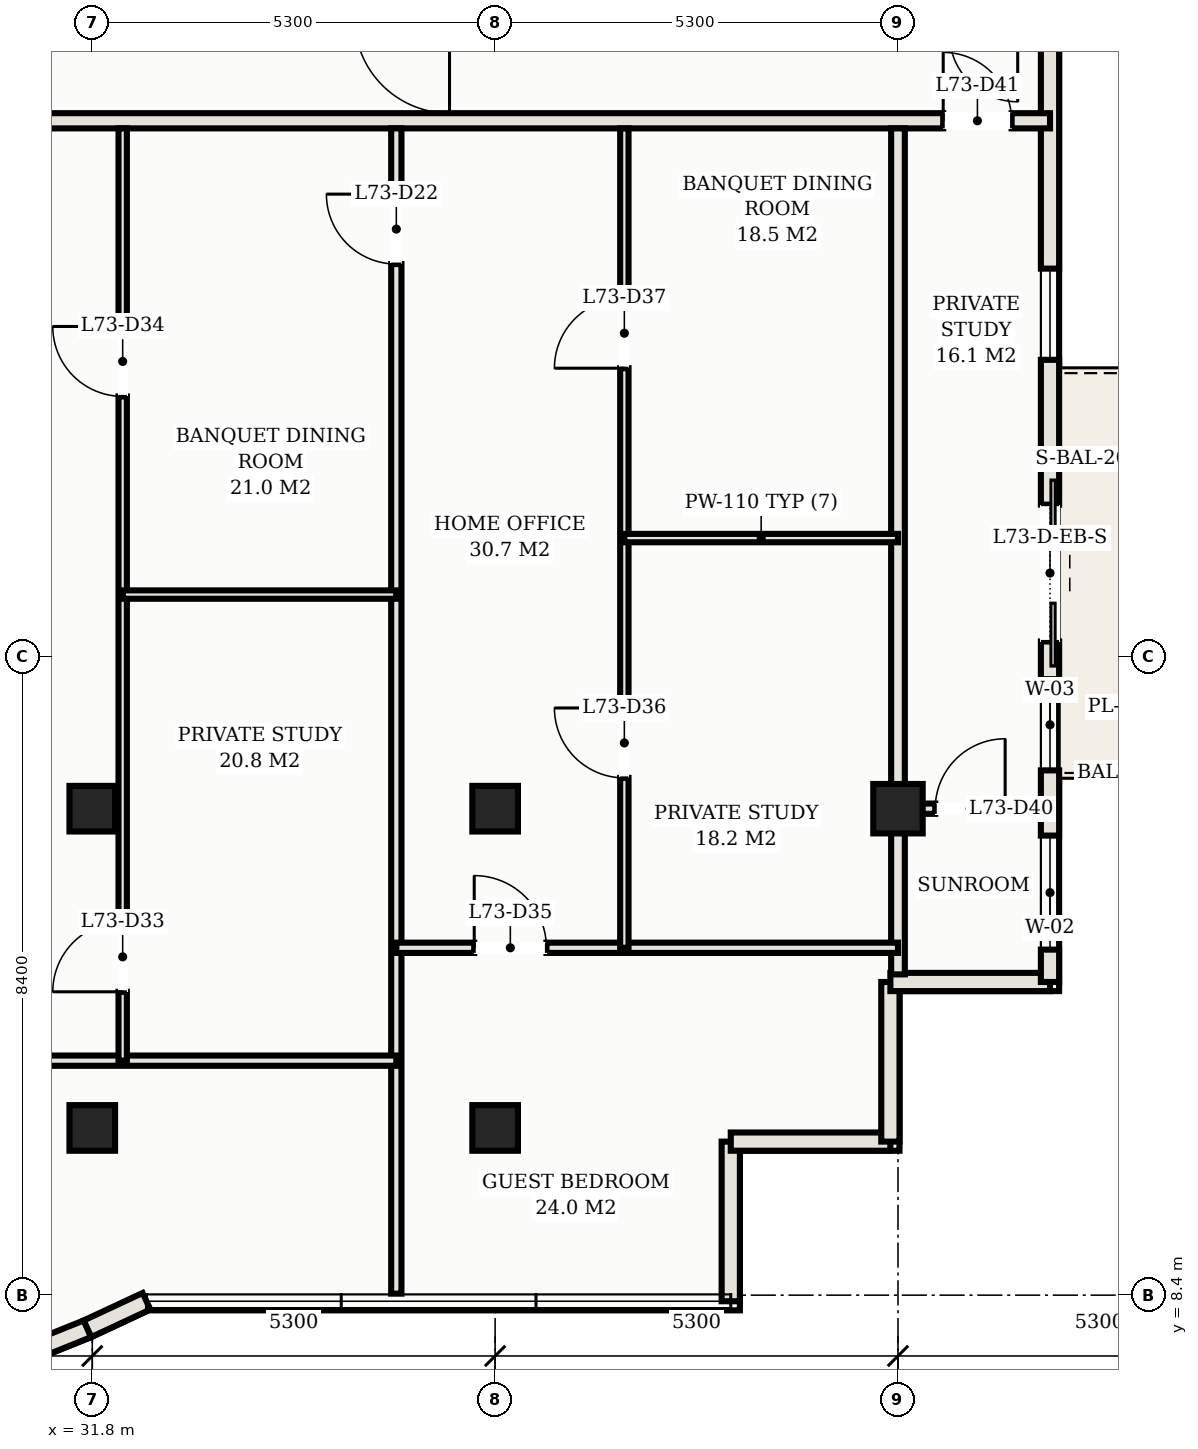
"""IFC4 building model, lengths in metres.
Left out: names, types, materials, properties, quantities, classifications, styles, units other than length and angle.
Written with IfcOpenShell. Run it as: python <this file> out.ifc"""

import sys

from ifc_helpers import new_model, si_unit, direction, frame, frame_2d, origin, origin_2d, place, context, subcontext, project, spatial, rectangle, hollow_rectangle, extrude, element, fill, save


model = new_model("IFC4")
c1 = context("Model", 3, precision=1e-05, world=origin(), true_north=direction((0.0, 1.0)))
c2 = subcontext(c1, "Body", "Model", "MODEL_VIEW")
j1 = project(units=[si_unit("LENGTHUNIT", "METRE"), si_unit("PLANEANGLEUNIT", "RADIAN")], contexts=[c1])
p1 = place(None, origin())
s1 = spatial("IfcSite", under=j1, at=p1, CompositionType="ELEMENT")
p2 = place(p1, origin())
s2 = spatial("IfcBuilding", under=s1, at=p2, CompositionType="ELEMENT")
p3 = place(p2, frame((0.0, 0.0, 262.7)))
s3 = spatial("IfcBuildingStorey", under=s2, at=p3, CompositionType="ELEMENT", Elevation=262.7)
p4 = place(p3, frame((31.8, 14.8, 0.0), z_axis=(0.0, 0.0, 1.0), x_axis=(1.0, 0.0, 0.0)))
e1 = element("IfcColumn", 1, at=p4, inside=s3, PredefinedType="COLUMN", context=c2, shape_type="SweptSolid", body=[
    extrude(hollow_rectangle(XDim=0.6, YDim=0.6, WallThickness=0.022, at=origin_2d()), origin(), (0.0, 0.0, 1.0), 3.3),
])
p5 = place(p3, frame((31.8, 10.6, 0.0), z_axis=(0.0, 0.0, 1.0), x_axis=(1.0, 0.0, 0.0)))
e2 = element("IfcColumn", 2, at=p5, inside=s3, PredefinedType="COLUMN", context=c2, shape_type="SweptSolid", body=[
    extrude(hollow_rectangle(XDim=0.6, YDim=0.6, WallThickness=0.022, at=origin_2d()), origin(), (0.0, 0.0, 1.0), 3.264),
])
p6 = place(p3, frame((37.1, 14.8, 0.0), z_axis=(0.0, 0.0, 1.0), x_axis=(1.0, 0.0, 0.0)))
e3 = element("IfcColumn", 3, at=p6, inside=s3, PredefinedType="COLUMN", context=c2, shape_type="SweptSolid", body=[
    extrude(hollow_rectangle(XDim=0.6, YDim=0.6, WallThickness=0.022, at=origin_2d()), origin(), (0.0, 0.0, 1.0), 3.3),
])
p7 = place(p3, frame((37.1, 10.6, 0.0), z_axis=(0.0, 0.0, 1.0), x_axis=(1.0, 0.0, 0.0)))
e4 = element("IfcColumn", 4, at=p7, inside=s3, PredefinedType="COLUMN", context=c2, shape_type="SweptSolid", body=[
    extrude(hollow_rectangle(XDim=0.6, YDim=0.6, WallThickness=0.022, at=origin_2d()), origin(), (0.0, 0.0, 1.0), 3.264),
])
p8 = place(p3, frame((42.4, 14.8, 0.0), z_axis=(0.0, 0.0, 1.0), x_axis=(1.0, 0.0, 0.0)))
e5 = element("IfcColumn", 5, at=p8, inside=s3, PredefinedType="COLUMN", context=c2, shape_type="SweptSolid", body=[
    extrude(hollow_rectangle(XDim=0.65, YDim=0.65, WallThickness=0.022, at=origin_2d()), origin(), (0.0, 0.0, 1.0), 3.3),
])
p9 = place(p3, frame((30.988, 7.657, 0.0), z_axis=(0.0, 0.0, 1.0), x_axis=(0.927870589467, 0.372902358805, 0.0)))
e6 = element("IfcWall", 6, at=p9, inside=s3, PredefinedType="SOLIDWALL", context=c2, shape_type="SweptSolid", body=[
    extrude(rectangle(XDim=0.807, YDim=0.24, at=frame_2d((0.404, 0.0))), origin(), (0.0, 0.0, 1.0), 3.04),
])
p10 = place(p3, frame((31.737, 7.958, 0.0), z_axis=(0.0, 0.0, 1.0), x_axis=(0.906190424584, 0.422869855147, 0.0)))
e7 = element("IfcWall", 7, at=p10, inside=s3, PredefinedType="SOLIDWALL", context=c2, shape_type="SweptSolid", body=[
    extrude(rectangle(XDim=0.856, YDim=0.24, at=frame_2d((0.428, 0.0))), origin(), (0.0, 0.0, 1.0), 3.04),
])
p11 = place(p3, frame((40.2, 8.32, 0.0), z_axis=(0.0, 0.0, 1.0), x_axis=(0.0, 1.0, 0.0)))
e8 = element("IfcWall", 8, at=p11, inside=s3, PredefinedType="SOLIDWALL", context=c2, shape_type="SweptSolid", body=[
    extrude(rectangle(XDim=2.1, YDim=0.24, at=frame_2d((1.05, 0.0))), origin(), (0.0, 0.0, 1.0), 3.04),
])
for number, where, z_axis, x_axis in (
    (9, (40.2, 10.42, 0.0), (0.0, 0.0, 1.0), (1.0, 0.0, 0.0)),
    (10, (42.3, 10.42, 0.0), (0.0, 0.0, 1.0), (0.0, 1.0, 0.0)),
):
    element("IfcWall", number, at=place(p3, frame(where, z_axis=z_axis, x_axis=x_axis)), inside=s3, PredefinedType="SOLIDWALL", context=c2, shape_type="SweptSolid", body=[
        extrude(rectangle(XDim=2.1, YDim=0.24, at=frame_2d((1.05, 0.0))), origin(), (0.0, 0.0, 1.0), 3.04),
    ])
p12 = place(p3, frame((42.3, 12.52, 0.0), z_axis=(0.0, 0.0, 1.0), x_axis=(1.0, 0.0, 0.0)))
e11 = element("IfcWall", 11, at=p12, inside=s3, PredefinedType="SOLIDWALL", context=c2, shape_type="SweptSolid", body=[
    extrude(rectangle(XDim=2.1, YDim=0.24, at=frame_2d((1.05, 0.0))), origin(), (0.0, 0.0, 1.0), 3.04),
])
p13 = place(p3, frame((44.4, 12.52, 0.0), z_axis=(0.0, 0.0, 1.0), x_axis=(0.0, 1.0, 0.0)))
e12 = element("IfcWall", 12, at=p13, inside=s3, PredefinedType="SOLIDWALL", context=c2, shape_type="SweptSolid", body=[
    extrude(rectangle(XDim=26.01, YDim=0.24, at=frame_2d((13.005, 0.0))), origin(), (0.0, 0.0, 1.0), 3.04),
])
p14 = place(p13, frame((4.48, 0.0, 0.0)))
e13 = element("IfcOpeningElement", 13, at=p14, cuts=e12, PredefinedType="OPENING", context=c2, shape_type="SweptSolid", body=[
    extrude(rectangle(XDim=1.8, YDim=2.2, at=frame_2d((0.9, 1.1))), frame((0.0, 0.13, 0.0), z_axis=(0.0, -1.0, 0.0), x_axis=(1.0, 0.0, 0.0)), (0.0, 0.0, 1.0), 0.26),
])
p15 = place(p13, frame((0.426, 0.0, 0.75)))
e14 = element("IfcOpeningElement", 14, at=p15, cuts=e12, PredefinedType="OPENING", context=c2, shape_type="SweptSolid", body=[
    extrude(rectangle(XDim=1.5, YDim=1.6, at=frame_2d((0.75, 0.8))), frame((0.0, 0.13, 0.0), z_axis=(0.0, -1.0, 0.0), x_axis=(1.0, 0.0, 0.0)), (0.0, 0.0, 1.0), 0.26),
])
p16 = place(p13, frame((2.784, 0.0, 0.75)))
e15 = element("IfcOpeningElement", 15, at=p16, cuts=e12, PredefinedType="OPENING", context=c2, shape_type="SweptSolid", body=[
    extrude(rectangle(XDim=1.2, YDim=1.5, at=frame_2d((0.6, 0.75))), frame((0.0, 0.13, 0.0), z_axis=(0.0, -1.0, 0.0), x_axis=(1.0, 0.0, 0.0)), (0.0, 0.0, 1.0), 0.26),
])
p17 = place(p13, frame((8.185, 0.0, 0.75)))
e16 = element("IfcOpeningElement", 16, at=p17, cuts=e12, PredefinedType="OPENING", context=c2, shape_type="SweptSolid", body=[
    extrude(rectangle(XDim=1.2, YDim=1.5, at=frame_2d((0.6, 0.75))), frame((0.0, 0.13, 0.0), z_axis=(0.0, -1.0, 0.0), x_axis=(1.0, 0.0, 0.0)), (0.0, 0.0, 1.0), 0.26),
])
p18 = place(p13, frame((18.625, 0.0, 0.75)))
e17 = element("IfcOpeningElement", 17, at=p18, cuts=e12, PredefinedType="OPENING", context=c2, shape_type="SweptSolid", body=[
    extrude(rectangle(XDim=1.2, YDim=1.5, at=frame_2d((0.6, 0.75))), frame((0.0, 0.13, 0.0), z_axis=(0.0, -1.0, 0.0), x_axis=(1.0, 0.0, 0.0)), (0.0, 0.0, 1.0), 0.26),
])
p19 = place(p3, frame((8.6, 23.85, 0.0), z_axis=(0.0, 0.0, 1.0), x_axis=(1.0, 0.0, 0.0)))
e18 = element("IfcWall", 18, at=p19, inside=s3, PredefinedType="PARTITIONING", context=c2, shape_type="SweptSolid", body=[
    extrude(rectangle(XDim=35.8, YDim=0.2, at=frame_2d((17.9, 0.0))), origin(), (0.0, 0.0, 1.0), 2.38),
])
p20 = place(p19, frame((2.625, 0.0, 0.0)))
e19 = element("IfcOpeningElement", 19, at=p20, cuts=e18, PredefinedType="OPENING", context=c2, shape_type="SweptSolid", body=[
    extrude(rectangle(XDim=1.35, YDim=2.26, at=frame_2d((0.675, 1.13))), frame((0.0, 0.11, 0.0), z_axis=(0.0, -1.0, 0.0), x_axis=(1.0, 0.0, 0.0)), (0.0, 0.0, 1.0), 0.22),
])
p21 = place(p19, frame((0.505, 0.0, 0.0)))
e20 = element("IfcOpeningElement", 20, at=p21, cuts=e18, PredefinedType="OPENING", context=c2, shape_type="SweptSolid", body=[
    extrude(rectangle(XDim=0.9, YDim=2.15, at=frame_2d((0.45, 1.075))), frame((0.0, 0.11, 0.0), z_axis=(0.0, -1.0, 0.0), x_axis=(1.0, 0.0, 0.0)), (0.0, 0.0, 1.0), 0.22),
])
p22 = place(p19, frame((34.395, 0.0, 0.0)))
e21 = element("IfcOpeningElement", 21, at=p22, cuts=e18, PredefinedType="OPENING", context=c2, shape_type="SweptSolid", body=[
    extrude(rectangle(XDim=0.9, YDim=2.15, at=frame_2d((0.45, 1.075))), frame((0.0, 0.11, 0.0), z_axis=(0.0, -1.0, 0.0), x_axis=(1.0, 0.0, 0.0)), (0.0, 0.0, 1.0), 0.22),
])
p23 = place(p3, frame((42.4, 12.62, 0.0), z_axis=(0.0, 0.0, 1.0), x_axis=(0.0, 1.0, 0.0)))
e22 = element("IfcWall", 22, at=p23, inside=s3, PredefinedType="PARTITIONING", context=c2, shape_type="SweptSolid", body=[
    extrude(rectangle(XDim=11.13, YDim=0.18, at=frame_2d((5.565, 0.0))), origin(), (0.0, 0.0, 1.0), 2.38),
])
p24 = place(p3, frame((35.8, 8.42, 0.0), z_axis=(0.0, 0.0, 1.0), x_axis=(0.0, 1.0, 0.0)))
e23 = element("IfcWall", 23, at=p24, inside=s3, PredefinedType="PARTITIONING", context=c2, shape_type="SweptSolid", body=[
    extrude(rectangle(XDim=15.33, YDim=0.135, at=frame_2d((7.665, 0.0))), origin(), (0.0, 0.0, 1.0), 2.38),
])
p25 = place(p24, frame((13.545, 0.0, 0.0)))
e24 = element("IfcOpeningElement", 24, at=p25, cuts=e23, PredefinedType="OPENING", context=c2, shape_type="SweptSolid", body=[
    extrude(rectangle(XDim=0.92, YDim=2.15, at=frame_2d((0.46, 1.075))), frame((0.0, 0.078, 0.0), z_axis=(0.0, -1.0, 0.0), x_axis=(1.0, 0.0, 0.0)), (0.0, 0.0, 1.0), 0.155),
])
p26 = place(p3, frame((26.5, 11.485, 0.0), z_axis=(0.0, 0.0, 1.0), x_axis=(1.0, 0.0, 0.0)))
e25 = element("IfcWall", 25, at=p26, inside=s3, PredefinedType="PARTITIONING", context=c2, shape_type="SweptSolid", body=[
    extrude(rectangle(XDim=9.3, YDim=0.135, at=frame_2d((4.65, 0.0))), origin(), (0.0, 0.0, 1.0), 2.38),
])
p27 = place(p26, frame((2.375, 0.0, 0.0)))
e26 = element("IfcOpeningElement", 26, at=p27, cuts=e25, PredefinedType="OPENING", context=c2, shape_type="SweptSolid", body=[
    extrude(rectangle(XDim=0.95, YDim=2.15, at=frame_2d((0.475, 1.075))), frame((0.0, 0.078, 0.0), z_axis=(0.0, -1.0, 0.0), x_axis=(1.0, 0.0, 0.0)), (0.0, 0.0, 1.0), 0.155),
])
p28 = place(p3, frame((32.2, 11.485, 0.0), z_axis=(0.0, 0.0, 1.0), x_axis=(0.0, 1.0, 0.0)))
e27 = element("IfcWall", 27, at=p28, inside=s3, PredefinedType="MOVABLE", context=c2, shape_type="SweptSolid", body=[
    extrude(rectangle(XDim=12.265, YDim=0.11, at=frame_2d((6.132, 0.0))), origin(), (0.0, 0.0, 1.0), 2.38),
])
p29 = place(p28, frame((0.906, 0.0, 0.0)))
e28 = element("IfcOpeningElement", 28, at=p29, cuts=e27, PredefinedType="OPENING", context=c2, shape_type="SweptSolid", body=[
    extrude(rectangle(XDim=0.92, YDim=2.15, at=frame_2d((0.46, 1.075))), frame((0.0, 0.065, 0.0), z_axis=(0.0, -1.0, 0.0), x_axis=(1.0, 0.0, 0.0)), (0.0, 0.0, 1.0), 0.13),
])
p30 = place(p28, frame((8.739, 0.0, 0.0)))
e29 = element("IfcOpeningElement", 29, at=p30, cuts=e27, PredefinedType="OPENING", context=c2, shape_type="SweptSolid", body=[
    extrude(rectangle(XDim=0.92, YDim=2.15, at=frame_2d((0.46, 1.075))), frame((0.0, 0.065, 0.0), z_axis=(0.0, -1.0, 0.0), x_axis=(1.0, 0.0, 0.0)), (0.0, 0.0, 1.0), 0.13),
])
p31 = place(p3, frame((32.2, 17.617, 0.0), z_axis=(0.0, 0.0, 1.0), x_axis=(1.0, 0.0, 0.0)))
e30 = element("IfcWall", 30, at=p31, inside=s3, PredefinedType="MOVABLE", context=c2, shape_type="SweptSolid", body=[
    extrude(rectangle(XDim=3.6, YDim=0.11, at=frame_2d((1.8, 0.0))), origin(), (0.0, 0.0, 1.0), 2.38),
])
p32 = place(p3, frame((35.8, 12.97, 0.0), z_axis=(0.0, 0.0, 1.0), x_axis=(1.0, 0.0, 0.0)))
e31 = element("IfcWall", 31, at=p32, inside=s3, PredefinedType="PARTITIONING", context=c2, shape_type="SweptSolid", body=[
    extrude(rectangle(XDim=6.6, YDim=0.135, at=frame_2d((3.3, 0.0))), origin(), (0.0, 0.0, 1.0), 2.38),
])
p33 = place(p32, frame((1.025, 0.0, 0.0)))
e32 = element("IfcOpeningElement", 32, at=p33, cuts=e31, PredefinedType="OPENING", context=c2, shape_type="SweptSolid", body=[
    extrude(rectangle(XDim=0.95, YDim=2.15, at=frame_2d((0.475, 1.075))), frame((0.0, 0.078, 0.0), z_axis=(0.0, -1.0, 0.0), x_axis=(1.0, 0.0, 0.0)), (0.0, 0.0, 1.0), 0.155),
])
p34 = place(p3, frame((38.8, 12.97, 0.0), z_axis=(0.0, 0.0, 1.0), x_axis=(0.0, 1.0, 0.0)))
e33 = element("IfcWall", 33, at=p34, inside=s3, PredefinedType="MOVABLE", context=c2, shape_type="SweptSolid", body=[
    extrude(rectangle(XDim=10.78, YDim=0.11, at=frame_2d((5.39, 0.0))), origin(), (0.0, 0.0, 1.0), 2.38),
])
p35 = place(p34, frame((2.235, 0.0, 0.0)))
e34 = element("IfcOpeningElement", 34, at=p35, cuts=e33, PredefinedType="OPENING", context=c2, shape_type="SweptSolid", body=[
    extrude(rectangle(XDim=0.92, YDim=2.15, at=frame_2d((0.46, 1.075))), frame((0.0, 0.065, 0.0), z_axis=(0.0, -1.0, 0.0), x_axis=(1.0, 0.0, 0.0)), (0.0, 0.0, 1.0), 0.13),
])
p36 = place(p34, frame((7.625, 0.0, 0.0)))
e35 = element("IfcOpeningElement", 35, at=p36, cuts=e33, PredefinedType="OPENING", context=c2, shape_type="SweptSolid", body=[
    extrude(rectangle(XDim=0.92, YDim=2.15, at=frame_2d((0.46, 1.075))), frame((0.0, 0.065, 0.0), z_axis=(0.0, -1.0, 0.0), x_axis=(1.0, 0.0, 0.0)), (0.0, 0.0, 1.0), 0.13),
])
p37 = place(p3, frame((38.8, 18.36, 0.0), z_axis=(0.0, 0.0, 1.0), x_axis=(1.0, 0.0, 0.0)))
e36 = element("IfcWall", 36, at=p37, inside=s3, PredefinedType="MOVABLE", context=c2, shape_type="SweptSolid", body=[
    extrude(rectangle(XDim=3.6, YDim=0.11, at=frame_2d((1.8, 0.0))), origin(), (0.0, 0.0, 1.0), 2.38),
])
p38 = place(p3, frame((42.4, 14.8, 0.0), z_axis=(0.0, 0.0, 1.0), x_axis=(1.0, 0.0, 0.0)))
e37 = element("IfcWall", 37, at=p38, inside=s3, PredefinedType="PARTITIONING", context=c2, shape_type="SweptSolid", body=[
    extrude(rectangle(XDim=1.9, YDim=0.135, at=frame_2d((0.95, 0.0))), origin(), (0.0, 0.0, 1.0), 2.38),
])
p39 = place(p38, frame((0.49, 0.0, 0.0)))
e38 = element("IfcOpeningElement", 38, at=p39, cuts=e37, PredefinedType="OPENING", context=c2, shape_type="SweptSolid", body=[
    extrude(rectangle(XDim=0.92, YDim=2.15, at=frame_2d((0.46, 1.075))), frame((0.0, 0.078, 0.0), z_axis=(0.0, -1.0, 0.0), x_axis=(1.0, 0.0, 0.0)), (0.0, 0.0, 1.0), 0.155),
])
p40 = place(p14, frame((1.8, 0.0, 0.0), z_axis=(0.0, 0.0, 1.0), x_axis=(-1.0, 0.0, 0.0)))
e39 = element("IfcDoor", 39, at=p40, inside=s3, OperationType="DOUBLE_DOOR_SLIDING", PredefinedType="DOOR", context=c2, shape_type="SweptSolid", body=[
    extrude(rectangle(XDim=1.8, YDim=2.2, at=frame_2d((0.9, 1.1))), frame((0.0, 0.025, 0.0), z_axis=(0.0, -1.0, 0.0), x_axis=(1.0, 0.0, 0.0)), (0.0, 0.0, 1.0), 0.05),
])
fill(e13, e39)
p41 = place(p15, origin())
e40 = element("IfcWindow", 40, at=p41, inside=s3, PartitioningType="SINGLE_PANEL", PredefinedType="WINDOW", context=c2, shape_type="SweptSolid", body=[
    extrude(rectangle(XDim=1.5, YDim=1.6, at=frame_2d((0.75, 0.8))), frame((0.0, 0.03, 0.0), z_axis=(0.0, -1.0, 0.0), x_axis=(1.0, 0.0, 0.0)), (0.0, 0.0, 1.0), 0.06),
])
fill(e14, e40)
p42 = place(p25, origin())
e41 = element("IfcDoor", 41, at=p42, inside=s3, OperationType="SINGLE_SWING_RIGHT", PredefinedType="DOOR", context=c2, shape_type="SweptSolid", body=[
    extrude(rectangle(XDim=0.92, YDim=2.15, at=frame_2d((0.46, 1.075))), frame((0.0, 0.025, 0.0), z_axis=(0.0, -1.0, 0.0), x_axis=(1.0, 0.0, 0.0)), (0.0, 0.0, 1.0), 0.05),
])
fill(e24, e41)
p43 = place(p29, origin())
e42 = element("IfcDoor", 42, at=p43, inside=s3, OperationType="SINGLE_SWING_LEFT", PredefinedType="DOOR", context=c2, shape_type="SweptSolid", body=[
    extrude(rectangle(XDim=0.92, YDim=2.15, at=frame_2d((0.46, 1.075))), frame((0.0, 0.025, 0.0), z_axis=(0.0, -1.0, 0.0), x_axis=(1.0, 0.0, 0.0)), (0.0, 0.0, 1.0), 0.05),
])
fill(e28, e42)
p44 = place(p30, origin())
e43 = element("IfcDoor", 43, at=p44, inside=s3, OperationType="SINGLE_SWING_RIGHT", PredefinedType="DOOR", context=c2, shape_type="SweptSolid", body=[
    extrude(rectangle(XDim=0.92, YDim=2.15, at=frame_2d((0.46, 1.075))), frame((0.0, 0.025, 0.0), z_axis=(0.0, -1.0, 0.0), x_axis=(1.0, 0.0, 0.0)), (0.0, 0.0, 1.0), 0.05),
])
fill(e29, e43)
p45 = place(p33, origin())
e44 = element("IfcDoor", 44, at=p45, inside=s3, OperationType="SINGLE_SWING_LEFT", PredefinedType="DOOR", context=c2, shape_type="SweptSolid", body=[
    extrude(rectangle(XDim=0.95, YDim=2.15, at=frame_2d((0.475, 1.075))), frame((0.0, 0.025, 0.0), z_axis=(0.0, -1.0, 0.0), x_axis=(1.0, 0.0, 0.0)), (0.0, 0.0, 1.0), 0.05),
])
fill(e32, e44)
p46 = place(p35, origin())
e45 = element("IfcDoor", 45, at=p46, inside=s3, OperationType="SINGLE_SWING_RIGHT", PredefinedType="DOOR", context=c2, shape_type="SweptSolid", body=[
    extrude(rectangle(XDim=0.92, YDim=2.15, at=frame_2d((0.46, 1.075))), frame((0.0, 0.025, 0.0), z_axis=(0.0, -1.0, 0.0), x_axis=(1.0, 0.0, 0.0)), (0.0, 0.0, 1.0), 0.05),
])
fill(e34, e45)
p47 = place(p36, origin())
e46 = element("IfcDoor", 46, at=p47, inside=s3, OperationType="SINGLE_SWING_LEFT", PredefinedType="DOOR", context=c2, shape_type="SweptSolid", body=[
    extrude(rectangle(XDim=0.92, YDim=2.15, at=frame_2d((0.46, 1.075))), frame((0.0, 0.025, 0.0), z_axis=(0.0, -1.0, 0.0), x_axis=(1.0, 0.0, 0.0)), (0.0, 0.0, 1.0), 0.05),
])
fill(e35, e46)
p48 = place(p39, origin())
e47 = element("IfcDoor", 47, at=p48, inside=s3, OperationType="SINGLE_SWING_RIGHT", PredefinedType="DOOR", context=c2, shape_type="SweptSolid", body=[
    extrude(rectangle(XDim=0.92, YDim=2.15, at=frame_2d((0.46, 1.075))), frame((0.0, 0.025, 0.0), z_axis=(0.0, -1.0, 0.0), x_axis=(1.0, 0.0, 0.0)), (0.0, 0.0, 1.0), 0.05),
])
fill(e38, e47)
p49 = place(p22, origin())
e48 = element("IfcDoor", 48, at=p49, inside=s3, OperationType="SINGLE_SWING_LEFT", PredefinedType="DOOR", context=c2, shape_type="SweptSolid", body=[
    extrude(rectangle(XDim=0.9, YDim=2.15, at=frame_2d((0.45, 1.075))), frame((0.0, 0.025, 0.0), z_axis=(0.0, -1.0, 0.0), x_axis=(1.0, 0.0, 0.0)), (0.0, 0.0, 1.0), 0.05),
])
fill(e21, e48)
p50 = place(p16, origin())
e49 = element("IfcWindow", 49, at=p50, inside=s3, PartitioningType="SINGLE_PANEL", PredefinedType="WINDOW", context=c2, shape_type="SweptSolid", body=[
    extrude(rectangle(XDim=1.2, YDim=1.5, at=frame_2d((0.6, 0.75))), frame((0.0, 0.03, 0.0), z_axis=(0.0, -1.0, 0.0), x_axis=(1.0, 0.0, 0.0)), (0.0, 0.0, 1.0), 0.06),
])
fill(e15, e49)
p51 = place(p17, origin())
e50 = element("IfcWindow", 50, at=p51, inside=s3, PartitioningType="SINGLE_PANEL", PredefinedType="WINDOW", context=c2, shape_type="SweptSolid", body=[
    extrude(rectangle(XDim=1.2, YDim=1.5, at=frame_2d((0.6, 0.75))), frame((0.0, 0.03, 0.0), z_axis=(0.0, -1.0, 0.0), x_axis=(1.0, 0.0, 0.0)), (0.0, 0.0, 1.0), 0.06),
])
fill(e16, e50)
save(model, sys.argv[1])
